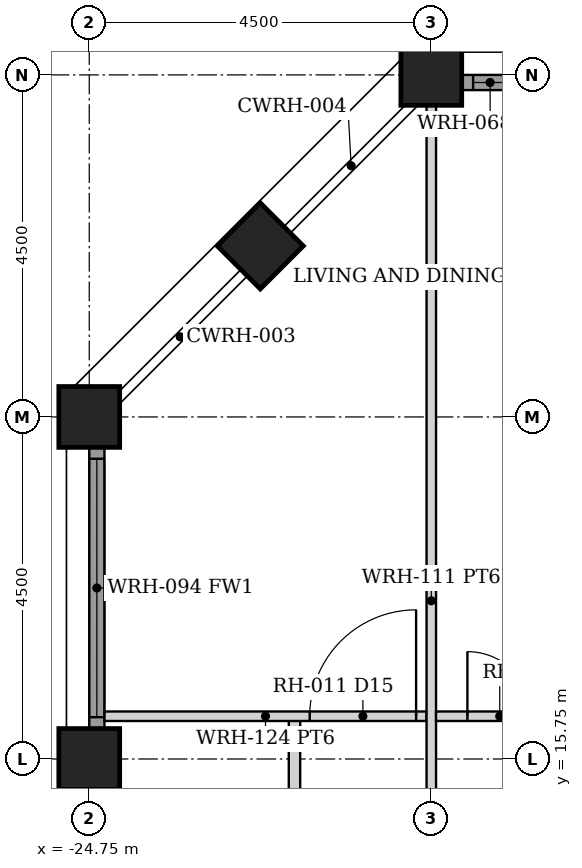
"""IFC4 building model, lengths in metres.
Left out: names, types, materials, properties, quantities, classifications, styles, units other than length and angle.
Written with IfcOpenShell. Run it as: python <this file> out.ifc"""

import sys

from ifc_helpers import new_model, si_unit, direction, frame, frame_2d, origin, origin_2d, place, context, subcontext, project, spatial, rectangle, hollow_rectangle, extrude, element, fill, save


model = new_model("IFC4")
c1 = context("Model", 3, precision=1e-05, world=origin(), true_north=direction((0.0, 1.0)))
c2 = subcontext(c1, "Body", "Model", "MODEL_VIEW")
j1 = project(units=[si_unit("LENGTHUNIT", "METRE"), si_unit("PLANEANGLEUNIT", "RADIAN")], contexts=[c1])
p1 = place(None, origin())
s1 = spatial("IfcSite", under=j1, at=p1, CompositionType="ELEMENT")
p2 = place(p1, origin())
s2 = spatial("IfcBuilding", under=s1, at=p2, CompositionType="ELEMENT")
p3 = place(p2, frame((0.0, 0.0, 103.5)))
s3 = spatial("IfcBuildingStorey", under=s2, at=p3, CompositionType="ELEMENT", Elevation=103.5)
for number, where, z_axis, x_axis in (
    (1, (-20.25, 24.75, 0.0), (0.0, 0.0, 1.0), (0.0, 1.0, 0.0)),
    (2, (-24.75, 15.75, 0.0), (0.0, 0.0, 1.0), (1.0, 0.0, 0.0)),
    (3, (-24.75, 20.25, 0.0), (0.0, 0.0, 1.0), (1.0, 0.0, 0.0)),
    (4, (-22.5, 22.5, 0.0), (0.0, 0.0, 1.0), (0.707, -0.707, 0.0)),
):
    element("IfcColumn", number, at=place(p3, frame(where, z_axis=z_axis, x_axis=x_axis)), inside=s3, PredefinedType="COLUMN", context=c2, shape_type="SweptSolid", body=[
        extrude(hollow_rectangle(XDim=0.8, YDim=0.8, WallThickness=0.06, at=origin_2d()), origin(), (0.0, 0.0, 1.0), 3.5),
    ])
p4 = place(p3, frame((-19.845, 24.65, 0.0), z_axis=(0.0, 0.0, 1.0), x_axis=(1.0, 0.0, 0.0)))
e5 = element("IfcWall", 5, at=p4, inside=s3, PredefinedType="SOLIDWALL", context=c2, shape_type="SweptSolid", body=[
    extrude(rectangle(XDim=3.69, YDim=0.2, at=frame_2d((1.845, 0.0))), origin(), (0.0, 0.0, 1.0), 2.279),
])
p5 = place(p4, frame((0.145, 0.0, 0.3)))
e6 = element("IfcOpeningElement", 6, at=p5, cuts=e5, PredefinedType="OPENING", context=c2, shape_type="SweptSolid", body=[
    extrude(rectangle(XDim=3.4, YDim=1.829, at=frame_2d((1.7, 0.915))), frame((0.0, 0.11, 0.0), z_axis=(0.0, -1.0, 0.0), x_axis=(1.0, 0.0, 0.0)), (0.0, 0.0, 1.0), 0.22),
])
p6 = place(p3, frame((-24.65, 16.155, 0.0), z_axis=(0.0, 0.0, 1.0), x_axis=(0.0, 1.0, 0.0)))
e7 = element("IfcWall", 7, at=p6, inside=s3, PredefinedType="SOLIDWALL", context=c2, shape_type="SweptSolid", body=[
    extrude(rectangle(XDim=3.69, YDim=0.2, at=frame_2d((1.845, 0.0))), origin(), (0.0, 0.0, 1.0), 2.279),
])
p7 = place(p6, frame((0.145, 0.0, 0.3)))
e8 = element("IfcOpeningElement", 8, at=p7, cuts=e7, PredefinedType="OPENING", context=c2, shape_type="SweptSolid", body=[
    extrude(rectangle(XDim=3.4, YDim=1.829, at=frame_2d((1.7, 0.915))), frame((0.0, 0.11, 0.0), z_axis=(0.0, -1.0, 0.0), x_axis=(1.0, 0.0, 0.0)), (0.0, 0.0, 1.0), 0.22),
])
p8 = place(p3, frame((-22.05, 11.312, 0.0), z_axis=(0.0, 0.0, 1.0), x_axis=(0.0, 1.0, 0.0)))
e9 = element("IfcWall", 9, at=p8, inside=s3, PredefinedType="PARTITIONING", context=c2, shape_type="SweptSolid", body=[
    extrude(rectangle(XDim=5.0, YDim=0.15, at=frame_2d((2.5, 0.0))), origin(), (0.0, 0.0, 1.0), 2.279),
])
p9 = place(p8, frame((2.05, 0.0, 0.0)))
e10 = element("IfcOpeningElement", 10, at=p9, cuts=e9, PredefinedType="OPENING", context=c2, shape_type="SweptSolid", body=[
    extrude(rectangle(XDim=0.9, YDim=2.1, at=frame_2d((0.45, 1.05))), frame((0.0, 0.085, 0.0), z_axis=(0.0, -1.0, 0.0), x_axis=(1.0, 0.0, 0.0)), (0.0, 0.0, 1.0), 0.17),
])
p10 = place(p3, frame((-24.55, 16.312, 0.0), z_axis=(0.0, 0.0, 1.0), x_axis=(1.0, 0.0, 0.0)))
e11 = element("IfcWall", 11, at=p10, inside=s3, PredefinedType="PARTITIONING", context=c2, shape_type="SweptSolid", body=[
    extrude(rectangle(XDim=4.238, YDim=0.125, at=frame_2d((2.119, 0.0))), origin(), (0.0, 0.0, 1.0), 2.279),
])
p11 = place(p10, frame((2.7, 0.0, 0.0)))
e12 = element("IfcOpeningElement", 12, at=p11, cuts=e11, PredefinedType="OPENING", context=c2, shape_type="SweptSolid", body=[
    extrude(rectangle(XDim=1.4, YDim=2.1, at=frame_2d((0.7, 1.05))), frame((0.0, 0.073, 0.0), z_axis=(0.0, -1.0, 0.0), x_axis=(1.0, 0.0, 0.0)), (0.0, 0.0, 1.0), 0.145),
])
p12 = place(p3, frame((-20.25, 11.312, 0.0), z_axis=(0.0, 0.0, 1.0), x_axis=(0.0, 1.0, 0.0)))
e13 = element("IfcWall", 13, at=p12, inside=s3, PredefinedType="PARTITIONING", context=c2, shape_type="SweptSolid", body=[
    extrude(rectangle(XDim=13.038, YDim=0.125, at=frame_2d((6.519, 0.0))), origin(), (0.0, 0.0, 1.0), 2.279),
])
p13 = place(p3, frame((-20.188, 16.312, 0.0), z_axis=(0.0, 0.0, 1.0), x_axis=(1.0, 0.0, 0.0)))
e14 = element("IfcWall", 14, at=p13, inside=s3, PredefinedType="PARTITIONING", context=c2, shape_type="SweptSolid", body=[
    extrude(rectangle(XDim=4.375, YDim=0.125, at=frame_2d((2.188, 0.0))), origin(), (0.0, 0.0, 1.0), 2.279),
])
p14 = place(p13, frame((0.413, 0.0, 0.0)))
e15 = element("IfcOpeningElement", 15, at=p14, cuts=e14, PredefinedType="OPENING", context=c2, shape_type="SweptSolid", body=[
    extrude(rectangle(XDim=0.85, YDim=2.1, at=frame_2d((0.425, 1.05))), frame((0.0, 0.073, 0.0), z_axis=(0.0, -1.0, 0.0), x_axis=(1.0, 0.0, 0.0)), (0.0, 0.0, 1.0), 0.145),
])
p15 = place(p13, frame((2.694, 0.0, 0.0)))
e16 = element("IfcOpeningElement", 16, at=p15, cuts=e14, PredefinedType="OPENING", context=c2, shape_type="SweptSolid", body=[
    extrude(rectangle(XDim=0.8, YDim=2.1, at=frame_2d((0.4, 1.05))), frame((0.0, 0.073, 0.0), z_axis=(0.0, -1.0, 0.0), x_axis=(1.0, 0.0, 0.0)), (0.0, 0.0, 1.0), 0.145),
])
p16 = place(p5, origin())
e17 = element("IfcWindow", 17, at=p16, inside=s3, PartitioningType="SINGLE_PANEL", PredefinedType="WINDOW", context=c2, shape_type="SweptSolid", body=[
    extrude(rectangle(XDim=3.4, YDim=1.829, at=frame_2d((1.7, 0.915))), frame((0.0, 0.03, 0.0), z_axis=(0.0, -1.0, 0.0), x_axis=(1.0, 0.0, 0.0)), (0.0, 0.0, 1.0), 0.06),
])
fill(e6, e17)
p17 = place(p7, origin())
e18 = element("IfcWindow", 18, at=p17, inside=s3, PartitioningType="SINGLE_PANEL", PredefinedType="WINDOW", context=c2, shape_type="SweptSolid", body=[
    extrude(rectangle(XDim=3.4, YDim=1.829, at=frame_2d((1.7, 0.915))), frame((0.0, 0.03, 0.0), z_axis=(0.0, -1.0, 0.0), x_axis=(1.0, 0.0, 0.0)), (0.0, 0.0, 1.0), 0.06),
])
fill(e8, e18)
p18 = place(p11, origin())
e19 = element("IfcDoor", 19, at=p18, inside=s3, OperationType="SINGLE_SWING_RIGHT", PredefinedType="DOOR", context=c2, shape_type="SweptSolid", body=[
    extrude(rectangle(XDim=1.4, YDim=2.1, at=frame_2d((0.7, 1.05))), frame((0.0, 0.025, 0.0), z_axis=(0.0, -1.0, 0.0), x_axis=(1.0, 0.0, 0.0)), (0.0, 0.0, 1.0), 0.05),
])
fill(e12, e19)
p19 = place(p14, origin())
e20 = element("IfcDoor", 20, at=p19, inside=s3, OperationType="SINGLE_SWING_LEFT", PredefinedType="DOOR", context=c2, shape_type="SweptSolid", body=[
    extrude(rectangle(XDim=0.85, YDim=2.1, at=frame_2d((0.425, 1.05))), frame((0.0, 0.025, 0.0), z_axis=(0.0, -1.0, 0.0), x_axis=(1.0, 0.0, 0.0)), (0.0, 0.0, 1.0), 0.05),
])
fill(e15, e20)
save(model, sys.argv[1])
